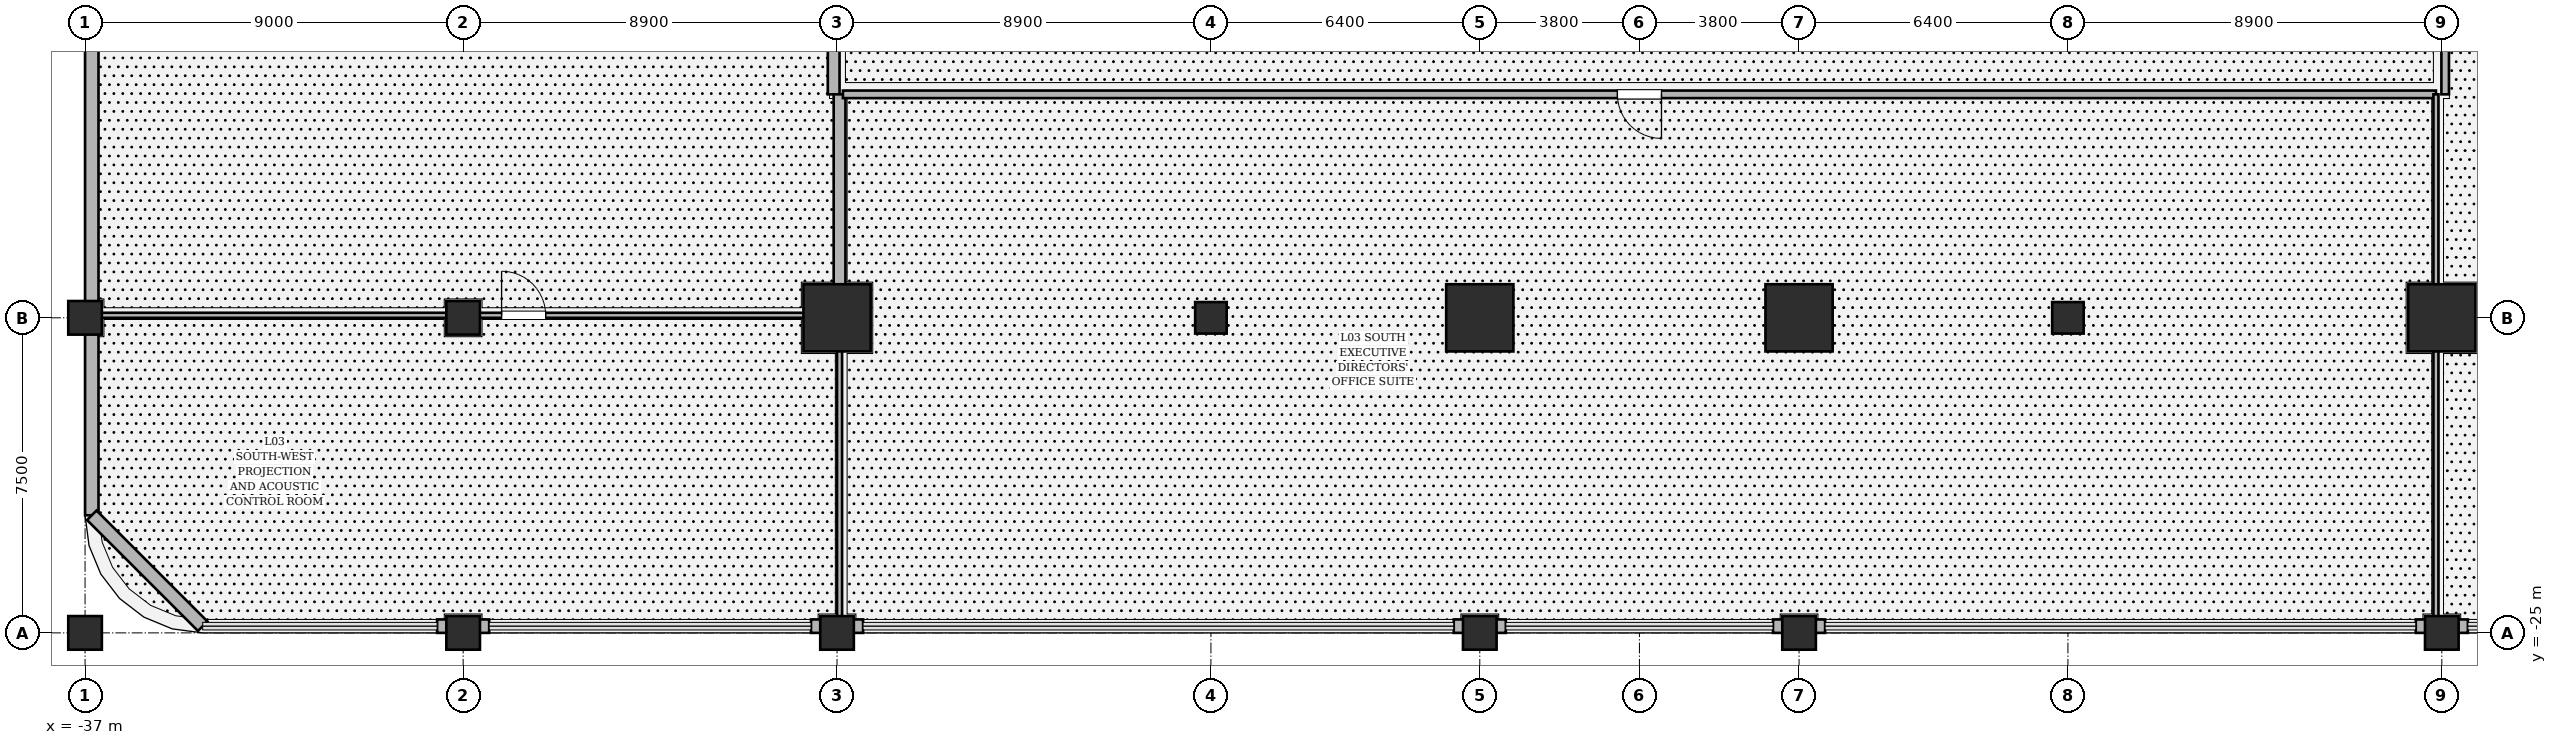
"""IFC4 building model, lengths in metres.
Left out: names, types, materials, properties, quantities, classifications, styles, units other than length and angle.
Written with IfcOpenShell. Run it as: python <this file> out.ifc"""

import sys

from ifc_helpers import new_model, si_unit, direction, frame, frame_2d, origin, origin_2d, place, context, subcontext, project, spatial, rectangle, hollow_rectangle, circle, extrude, element, fill, save


model = new_model("IFC4")
c1 = context("Model", 3, precision=1e-05, world=origin(), true_north=direction((0.0, 1.0)))
c2 = subcontext(c1, "Body", "Model", "MODEL_VIEW")
j1 = project(units=[si_unit("LENGTHUNIT", "METRE"), si_unit("PLANEANGLEUNIT", "RADIAN")], contexts=[c1])
p1 = place(None, origin())
s1 = spatial("IfcSite", under=j1, at=p1, CompositionType="ELEMENT")
p2 = place(p1, origin())
s2 = spatial("IfcBuilding", under=s1, at=p2, CompositionType="ELEMENT")
p3 = place(p2, frame((0.0, 0.0, 16.8)))
s3 = spatial("IfcBuildingStorey", under=s2, at=p3, CompositionType="ELEMENT", Elevation=16.8)
for number, where, z_axis, x_axis in (
    (1, (-19.1, -17.5, 0.0), (0.0, 0.0, 1.0), (1.0, 0.0, 0.0)),
    (2, (-3.8, -17.5, 0.0), (0.0, 0.0, 1.0), (1.0, 0.0, 0.0)),
    (3, (3.8, -17.5, 0.0), (0.0, 0.0, 1.0), (1.0, 0.0, 0.0)),
    (4, (19.1, -17.5, 0.0), (0.0, 0.0, 1.0), (1.0, 0.0, 0.0)),
):
    element("IfcColumn", number, at=place(p3, frame(where, z_axis=z_axis, x_axis=x_axis)), inside=s3, PredefinedType="COLUMN", context=c2, shape_type="SweptSolid", body=[
        extrude(hollow_rectangle(XDim=1.6, YDim=1.6, WallThickness=0.05, at=origin_2d()), origin(), (0.0, 0.0, 1.0), 5.4),
    ])
for number, where, z_axis, x_axis in (
    (5, (-37.0, -25.0, 0.0), (0.0, 0.0, 1.0), (1.0, 0.0, 0.0)),
    (6, (-28.0, -25.0, 0.0), (0.0, 0.0, 1.0), (1.0, 0.0, 0.0)),
    (7, (-19.1, -25.0, 0.0), (0.0, 0.0, 1.0), (1.0, 0.0, 0.0)),
    (8, (-3.8, -25.0, 0.0), (0.0, 0.0, 1.0), (1.0, 0.0, 0.0)),
    (9, (3.8, -25.0, 0.0), (0.0, 0.0, 1.0), (1.0, 0.0, 0.0)),
    (10, (19.1, -25.0, 0.0), (0.0, 0.0, 1.0), (1.0, 0.0, 0.0)),
    (11, (-37.0, -17.5, 0.0), (0.0, 0.0, 1.0), (1.0, 0.0, 0.0)),
    (12, (-28.0, -17.5, 0.0), (0.0, 0.0, 1.0), (1.0, 0.0, 0.0)),
):
    element("IfcColumn", number, at=place(p3, frame(where, z_axis=z_axis, x_axis=x_axis)), inside=s3, PredefinedType="COLUMN", context=c2, shape_type="SweptSolid", body=[
        extrude(rectangle(XDim=0.8, YDim=0.8, at=origin_2d()), origin(), (0.0, 0.0, 1.0), 5.4),
    ])
for number, where, z_axis, x_axis in (
    (13, (-10.2, -17.5, 0.0), (0.0, 0.0, 1.0), (1.0, 0.0, 0.0)),
    (14, (10.2, -17.5, 0.0), (0.0, 0.0, 1.0), (1.0, 0.0, 0.0)),
):
    element("IfcColumn", number, at=place(p3, frame(where, z_axis=z_axis, x_axis=x_axis)), inside=s3, PredefinedType="PILASTER", context=c2, shape_type="SweptSolid", body=[
        extrude(circle(Radius=0.375, at=origin_2d()), origin(), (0.0, 0.0, 1.0), 5.4),
    ])
p4 = place(p3, frame((-28.62, -24.84, 0.0), z_axis=(0.0, 0.0, 1.0), x_axis=(1.0, 0.0, 0.0)))
e15 = element("IfcWall", 15, at=p4, inside=s3, PredefinedType="SOLIDWALL", context=c2, shape_type="SweptSolid", body=[
    extrude(rectangle(XDim=1.24, YDim=0.32, at=frame_2d((0.62, 0.0))), origin(), (0.0, 0.0, 1.0), 4.314),
])
for number, where, z_axis, x_axis in (
    (16, (-19.72, -24.84, 0.0), (0.0, 0.0, 1.0), (1.0, 0.0, 0.0)),
    (17, (-4.42, -24.84, 0.0), (0.0, 0.0, 1.0), (1.0, 0.0, 0.0)),
    (18, (3.18, -24.84, 0.0), (0.0, 0.0, 1.0), (1.0, 0.0, 0.0)),
    (19, (18.48, -24.84, 0.0), (0.0, 0.0, 1.0), (1.0, 0.0, 0.0)),
):
    element("IfcWall", number, at=place(p3, frame(where, z_axis=z_axis, x_axis=x_axis)), inside=s3, PredefinedType="SOLIDWALL", context=c2, shape_type="SweptSolid", body=[
        extrude(rectangle(XDim=1.24, YDim=0.32, at=frame_2d((0.62, 0.0))), origin(), (0.0, 0.0, 1.0), 4.314),
    ])
p5 = place(p3, frame((-36.84, -22.2, 0.0), z_axis=(0.0, 0.0, 1.0), x_axis=(0.0, 1.0, 0.0)))
e20 = element("IfcWall", 20, at=p5, inside=s3, PredefinedType="SOLIDWALL", context=c2, shape_type="SweptSolid", body=[
    extrude(rectangle(XDim=44.4, YDim=0.32, at=frame_2d((22.2, 0.0))), origin(), (0.0, 0.0, 1.0), 3.164),
])
p6 = place(p3, frame((-34.2, -24.84, 0.0), z_axis=(0.0, 0.0, 1.0), x_axis=(-0.707106781187, 0.707106781187, 0.0)))
e21 = element("IfcWall", 21, at=p6, inside=s3, PredefinedType="SOLIDWALL", context=c2, shape_type="SweptSolid", body=[
    extrude(rectangle(XDim=3.734, YDim=0.32, at=frame_2d((1.867, 0.0))), origin(), (0.0, 0.0, 1.0), 4.464),
])
p7 = place(p3, frame((-36.78, -17.44, 0.0), z_axis=(0.0, 0.0, 1.0), x_axis=(1.0, 0.0, 0.0)))
e22 = element("IfcWall", 22, at=p7, inside=s3, PredefinedType="PARTITIONING", context=c2, shape_type="SweptSolid", body=[
    extrude(rectangle(XDim=17.74, YDim=0.12, at=frame_2d((8.87, 0.0))), origin(), (0.0, 0.0, 1.0), 3.164),
])
p8 = place(p7, frame((9.695, 0.0, 0.0)))
e23 = element("IfcOpeningElement", 23, at=p8, cuts=e22, PredefinedType="OPENING", context=c2, shape_type="SweptSolid", body=[
    extrude(rectangle(XDim=1.05, YDim=2.2, at=frame_2d((0.525, 1.1))), frame((0.0, 0.07, 0.0), z_axis=(0.0, -1.0, 0.0), x_axis=(1.0, 0.0, 0.0)), (0.0, 0.0, 1.0), 0.14),
])
p9 = place(p3, frame((-19.04, -17.44, 0.0), z_axis=(0.0, 0.0, 1.0), x_axis=(0.0, -1.0, 0.0)))
e24 = element("IfcWall", 24, at=p9, inside=s3, PredefinedType="PARTITIONING", context=c2, shape_type="SweptSolid", body=[
    extrude(rectangle(XDim=7.34, YDim=0.12, at=frame_2d((3.67, 0.0))), origin(), (0.0, 0.0, 1.0), 3.164),
])
p10 = place(p3, frame((-19.18, 17.36, 0.0), z_axis=(0.0, 0.0, 1.0), x_axis=(0.0, -1.0, 0.0)))
e25 = element("IfcWall", 25, at=p10, inside=s3, PredefinedType="SOLIDWALL", context=c2, shape_type="SweptSolid", body=[
    extrude(rectangle(XDim=29.54, YDim=0.28, at=frame_2d((14.77, 0.0))), origin(), (0.0, 0.0, 1.0), 3.164),
])
p11 = place(p10, frame((15.22, 0.0, 0.0)))
e26 = element("IfcOpeningElement", 26, at=p11, cuts=e25, PredefinedType="OPENING", context=c2, shape_type="SweptSolid", body=[
    extrude(rectangle(XDim=1.8, YDim=2.35, at=frame_2d((0.9, 1.175))), frame((0.0, 0.15, 0.0), z_axis=(0.0, -1.0, 0.0), x_axis=(1.0, 0.0, 0.0)), (0.0, 0.0, 1.0), 0.3),
])
p12 = place(p3, frame((-19.04, -12.18, 0.0), z_axis=(0.0, 0.0, 1.0), x_axis=(0.0, -1.0, 0.0)))
e27 = element("IfcWall", 27, at=p12, inside=s3, PredefinedType="SOLIDWALL", context=c2, shape_type="SweptSolid", body=[
    extrude(rectangle(XDim=5.18, YDim=0.28, at=frame_2d((2.59, 0.0))), origin(), (0.0, 0.0, 1.0), 3.164),
])
p13 = place(p3, frame((-18.96, -12.18, 0.0), z_axis=(0.0, 0.0, 1.0), x_axis=(1.0, 0.0, 0.0)))
e28 = element("IfcWall", 28, at=p13, inside=s3, PredefinedType="PARTITIONING", context=c2, shape_type="SweptSolid", body=[
    extrude(rectangle(XDim=37.92, YDim=0.18, at=frame_2d((18.96, 0.0))), origin(), (0.0, 0.0, 1.0), 4.314),
])
p14 = place(p13, frame((18.435, 0.0, 0.0)))
e29 = element("IfcOpeningElement", 29, at=p14, cuts=e28, PredefinedType="OPENING", context=c2, shape_type="SweptSolid", body=[
    extrude(rectangle(XDim=1.05, YDim=2.2, at=frame_2d((0.525, 1.1))), frame((0.0, 0.1, 0.0), z_axis=(0.0, -1.0, 0.0), x_axis=(1.0, 0.0, 0.0)), (0.0, 0.0, 1.0), 0.2),
])
p15 = place(p3, frame((18.96, -12.18, 0.0), z_axis=(0.0, 0.0, 1.0), x_axis=(0.0, -1.0, 0.0)))
e30 = element("IfcWall", 30, at=p15, inside=s3, PredefinedType="PARTITIONING", context=c2, shape_type="SweptSolid", body=[
    extrude(rectangle(XDim=12.6, YDim=0.12, at=frame_2d((6.3, 0.0))), origin(), (0.0, 0.0, 1.0), 4.314),
])
p16 = place(p3, frame((19.18, -12.18, 0.0), z_axis=(0.0, 0.0, 1.0), x_axis=(0.0, 1.0, 0.0)))
e31 = element("IfcWall", 31, at=p16, inside=s3, PredefinedType="PARTITIONING", context=c2, shape_type="SweptSolid", body=[
    extrude(rectangle(XDim=14.4, YDim=0.18, at=frame_2d((7.2, 0.0))), origin(), (0.0, 0.0, 1.0), 4.314),
])
p17 = place(p16, frame((6.05, 0.0, 0.0)))
e32 = element("IfcOpeningElement", 32, at=p17, cuts=e31, PredefinedType="OPENING", context=c2, shape_type="SweptSolid", body=[
    extrude(rectangle(XDim=1.4, YDim=2.25, at=frame_2d((0.7, 1.125))), frame((0.0, 0.1, 0.0), z_axis=(0.0, -1.0, 0.0), x_axis=(1.0, 0.0, 0.0)), (0.0, 0.0, 1.0), 0.2),
])
p18 = place(p8, origin())
e33 = element("IfcDoor", 33, at=p18, inside=s3, OperationType="SINGLE_SWING_LEFT", PredefinedType="DOOR", context=c2, shape_type="SweptSolid", body=[
    extrude(rectangle(XDim=1.05, YDim=2.2, at=frame_2d((0.525, 1.1))), frame((0.0, 0.025, 0.0), z_axis=(0.0, -1.0, 0.0), x_axis=(1.0, 0.0, 0.0)), (0.0, 0.0, 1.0), 0.05),
])
fill(e23, e33)
p19 = place(p14, origin())
e34 = element("IfcDoor", 34, at=p19, inside=s3, OperationType="SINGLE_SWING_RIGHT", PredefinedType="DOOR", context=c2, shape_type="SweptSolid", body=[
    extrude(rectangle(XDim=1.05, YDim=2.2, at=frame_2d((0.525, 1.1))), frame((0.0, 0.025, 0.0), z_axis=(0.0, -1.0, 0.0), x_axis=(1.0, 0.0, 0.0)), (0.0, 0.0, 1.0), 0.05),
])
fill(e29, e34)
save(model, sys.argv[1])
